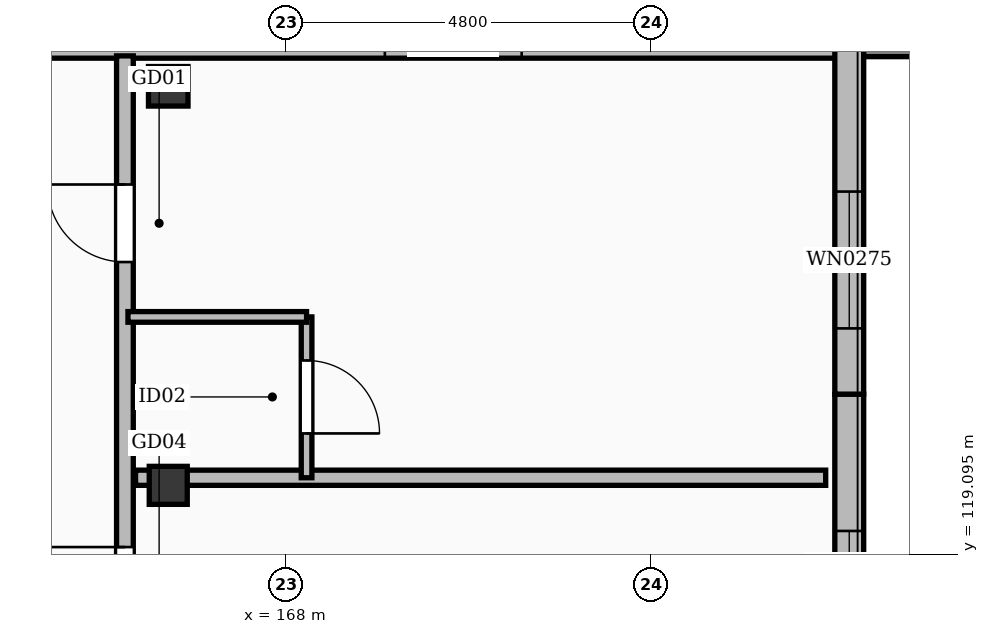
"""IFC4 building model, lengths in metres.
Left out: names, types, materials, properties, quantities, classifications, styles, units other than length and angle.
Written with IfcOpenShell. Run it as: python <this file> out.ifc"""

import sys

from ifc_helpers import new_model, si_unit, direction, frame, frame_2d, origin, origin_2d, place, context, subcontext, project, spatial, polyline, rectangle, outline, extrude, element, fill, save


model = new_model("IFC4")
c1 = context("Model", 3, precision=1e-05, world=origin(), true_north=direction((0.0, 1.0)))
c2 = subcontext(c1, "Body", "Model", "MODEL_VIEW")
j1 = project(units=[si_unit("LENGTHUNIT", "METRE"), si_unit("PLANEANGLEUNIT", "RADIAN")], contexts=[c1])
p1 = place(None, origin())
s1 = spatial("IfcSite", under=j1, at=p1, CompositionType="ELEMENT")
p2 = place(p1, origin())
s2 = spatial("IfcBuilding", under=s1, at=p2, CompositionType="ELEMENT")
p3 = place(p2, frame((0.0, 0.0, 50.4)))
s3 = spatial("IfcBuildingStorey", under=s2, at=p3, CompositionType="ELEMENT", Elevation=50.4)
p4 = place(p3, frame((166.45, 125.25, 0.0), z_axis=(0.0, 0.0, 1.0), x_axis=(1.0, 0.0, 0.0)))
e1 = element("IfcColumn", 1, at=p4, inside=s3, PredefinedType="COLUMN", context=c2, shape_type="SweptSolid", body=[
    extrude(rectangle(XDim=0.52, YDim=0.52, at=origin_2d()), origin(), (0.0, 0.0, 1.0), 4.2),
])
p5 = place(p3, frame((166.45, 120.0, 0.0), z_axis=(0.0, 0.0, 1.0), x_axis=(1.0, 0.0, 0.0)))
e2 = element("IfcColumn", 2, at=p5, inside=s3, PredefinedType="COLUMN", context=c2, shape_type="SweptSolid", body=[
    extrude(rectangle(XDim=0.5, YDim=0.5, at=origin_2d()), origin(), (0.0, 0.0, 1.0), 4.2),
])
p6 = place(p3, frame((153.3, 125.81, 0.0), z_axis=(0.0, 0.0, 1.0), x_axis=(1.0, 0.0, 0.0)))
e3 = element("IfcWall", 3, at=p6, inside=s3, PredefinedType="SOLIDWALL", context=c2, shape_type="SweptSolid", body=[
    extrude(rectangle(XDim=22.2, YDim=0.38, at=frame_2d((11.1, 0.0))), origin(), (0.0, 0.0, 1.0), 3.96),
])
p7 = place(p6, frame((2.8, 0.0, 0.55)))
e4 = element("IfcOpeningElement", 4, at=p7, cuts=e3, PredefinedType="OPENING", context=c2, shape_type="SweptSolid", body=[
    extrude(rectangle(XDim=1.8, YDim=1.76, at=frame_2d((0.9, 0.88))), frame((0.0, 0.202, 0.0), z_axis=(0.0, -1.0, 0.0), x_axis=(1.0, 0.0, 0.0)), (0.0, 0.0, 1.0), 0.404),
])
p8 = place(p6, frame((9.6, 0.0, 0.55)))
e5 = element("IfcOpeningElement", 5, at=p8, cuts=e3, PredefinedType="OPENING", context=c2, shape_type="SweptSolid", body=[
    extrude(rectangle(XDim=1.8, YDim=1.76, at=frame_2d((0.9, 0.88))), frame((0.0, 0.202, 0.0), z_axis=(0.0, -1.0, 0.0), x_axis=(1.0, 0.0, 0.0)), (0.0, 0.0, 1.0), 0.404),
])
p9 = place(p6, frame((16.0, 0.0, 0.55)))
e6 = element("IfcOpeningElement", 6, at=p9, cuts=e3, PredefinedType="OPENING", context=c2, shape_type="SweptSolid", body=[
    extrude(rectangle(XDim=1.8, YDim=1.76, at=frame_2d((0.9, 0.88))), frame((0.0, 0.202, 0.0), z_axis=(0.0, -1.0, 0.0), x_axis=(1.0, 0.0, 0.0)), (0.0, 0.0, 1.0), 0.404),
])
p10 = place(p3, frame((175.41, 121.2, 0.0), z_axis=(0.0, 0.0, 1.0), x_axis=(0.0, -1.0, 0.0)))
e7 = element("IfcWall", 7, at=p10, inside=s3, PredefinedType="SOLIDWALL", context=c2, shape_type="SweptSolid", body=[
    extrude(rectangle(XDim=4.8, YDim=0.38, at=frame_2d((2.4, 0.0))), origin(), (0.0, 0.0, 1.0), 3.96),
])
p11 = place(p10, frame((1.8, 0.0, 0.35)))
e8 = element("IfcOpeningElement", 8, at=p11, cuts=e7, PredefinedType="OPENING", context=c2, shape_type="SweptSolid", body=[
    extrude(rectangle(XDim=0.9, YDim=1.68, at=frame_2d((0.45, 0.84))), frame((0.0, 0.202, 0.0), z_axis=(0.0, -1.0, 0.0), x_axis=(1.0, 0.0, 0.0)), (0.0, 0.0, 1.0), 0.404),
])
p12 = place(p10, frame((3.135, 0.0, 0.55)))
e9 = element("IfcOpeningElement", 9, at=p12, cuts=e7, PredefinedType="OPENING", context=c2, shape_type="SweptSolid", body=[
    extrude(rectangle(XDim=1.2, YDim=1.72, at=frame_2d((0.6, 0.86))), frame((0.0, 0.202, 0.0), z_axis=(0.0, -1.0, 0.0), x_axis=(1.0, 0.0, 0.0)), (0.0, 0.0, 1.0), 0.404),
])
p13 = place(p3, frame((175.41, 126.0, 0.0), z_axis=(0.0, 0.0, 1.0), x_axis=(0.0, -1.0, 0.0)))
e10 = element("IfcWall", 10, at=p13, inside=s3, PredefinedType="SOLIDWALL", context=c2, shape_type="SweptSolid", body=[
    extrude(rectangle(XDim=4.8, YDim=0.38, at=frame_2d((2.4, 0.0))), origin(), (0.0, 0.0, 1.0), 3.96),
])
p14 = place(p13, frame((2.135, 0.0, 0.55)))
e11 = element("IfcOpeningElement", 11, at=p14, cuts=e10, PredefinedType="OPENING", context=c2, shape_type="SweptSolid", body=[
    extrude(rectangle(XDim=1.8, YDim=1.76, at=frame_2d((0.9, 0.88))), frame((0.0, 0.202, 0.0), z_axis=(0.0, -1.0, 0.0), x_axis=(1.0, 0.0, 0.0)), (0.0, 0.0, 1.0), 0.404),
])
p15 = place(p3, frame((175.6, 125.82, 0.0), z_axis=(0.0, 0.0, 1.0), x_axis=(1.0, 0.0, 0.0)))
e12 = element("IfcWall", 12, at=p15, inside=s3, PredefinedType="SOLIDWALL", context=c2, shape_type="SweptSolid", body=[
    extrude(outline(polyline([(0.0, 0.0), (4.4, 0.0), (4.4, 0.05), (0.0, 3.723), (0.0, 0.0)])), frame((0.0, 0.18, 0.0), z_axis=(0.0, -1.0, 0.0), x_axis=(1.0, 0.0, 0.0)), (0.0, 0.0, 1.0), 0.36),
])
p16 = place(p3, frame((165.88, 73.55, 0.0), z_axis=(0.0, 0.0, 1.0), x_axis=(0.0, 1.0, 0.0)))
e13 = element("IfcWall", 13, at=p16, inside=s3, PredefinedType="PARTITIONING", context=c2, shape_type="SweptSolid", body=[
    extrude(rectangle(XDim=52.1, YDim=0.22, at=frame_2d((26.05, 0.0))), origin(), (0.0, 0.0, 1.0), 3.202),
])
p17 = place(p16, frame((5.9, 0.0, 0.0)))
e14 = element("IfcOpeningElement", 14, at=p17, cuts=e13, PredefinedType="OPENING", context=c2, shape_type="SweptSolid", body=[
    extrude(rectangle(XDim=1.12, YDim=2.15, at=frame_2d((0.56, 1.075))), frame((0.0, 0.122, 0.0), z_axis=(0.0, -1.0, 0.0), x_axis=(1.0, 0.0, 0.0)), (0.0, 0.0, 1.0), 0.244),
])
p18 = place(p16, frame((15.788, 0.0, 0.0)))
e15 = element("IfcOpeningElement", 15, at=p18, cuts=e13, PredefinedType="OPENING", context=c2, shape_type="SweptSolid", body=[
    extrude(rectangle(XDim=1.05, YDim=2.22, at=frame_2d((0.525, 1.11))), frame((0.0, 0.122, 0.0), z_axis=(0.0, -1.0, 0.0), x_axis=(1.0, 0.0, 0.0)), (0.0, 0.0, 1.0), 0.244),
])
p19 = place(p16, frame((20.588, 0.0, 0.0)))
e16 = element("IfcOpeningElement", 16, at=p19, cuts=e13, PredefinedType="OPENING", context=c2, shape_type="SweptSolid", body=[
    extrude(rectangle(XDim=1.02, YDim=2.2, at=frame_2d((0.51, 1.1))), frame((0.0, 0.122, 0.0), z_axis=(0.0, -1.0, 0.0), x_axis=(1.0, 0.0, 0.0)), (0.0, 0.0, 1.0), 0.244),
])
p20 = place(p16, frame((25.388, 0.0, 0.0)))
e17 = element("IfcOpeningElement", 17, at=p20, cuts=e13, PredefinedType="OPENING", context=c2, shape_type="SweptSolid", body=[
    extrude(rectangle(XDim=1.14, YDim=2.26, at=frame_2d((0.57, 1.13))), frame((0.0, 0.122, 0.0), z_axis=(0.0, -1.0, 0.0), x_axis=(1.0, 0.0, 0.0)), (0.0, 0.0, 1.0), 0.244),
])
p21 = place(p16, frame((30.188, 0.0, 0.0)))
e18 = element("IfcOpeningElement", 18, at=p21, cuts=e13, PredefinedType="OPENING", context=c2, shape_type="SweptSolid", body=[
    extrude(rectangle(XDim=0.98, YDim=2.15, at=frame_2d((0.49, 1.075))), frame((0.0, 0.122, 0.0), z_axis=(0.0, -1.0, 0.0), x_axis=(1.0, 0.0, 0.0)), (0.0, 0.0, 1.0), 0.244),
])
p22 = place(p16, frame((34.988, 0.0, 0.0)))
e19 = element("IfcOpeningElement", 19, at=p22, cuts=e13, PredefinedType="OPENING", context=c2, shape_type="SweptSolid", body=[
    extrude(rectangle(XDim=1.28, YDim=2.16, at=frame_2d((0.64, 1.08))), frame((0.0, 0.122, 0.0), z_axis=(0.0, -1.0, 0.0), x_axis=(1.0, 0.0, 0.0)), (0.0, 0.0, 1.0), 0.244),
])
p23 = place(p16, frame((39.788, 0.0, 0.0)))
e20 = element("IfcOpeningElement", 20, at=p23, cuts=e13, PredefinedType="OPENING", context=c2, shape_type="SweptSolid", body=[
    extrude(rectangle(XDim=0.9, YDim=2.08, at=frame_2d((0.45, 1.04))), frame((0.0, 0.122, 0.0), z_axis=(0.0, -1.0, 0.0), x_axis=(1.0, 0.0, 0.0)), (0.0, 0.0, 1.0), 0.244),
])
p24 = place(p16, frame((44.588, 0.0, 0.0)))
e21 = element("IfcOpeningElement", 21, at=p24, cuts=e13, PredefinedType="OPENING", context=c2, shape_type="SweptSolid", body=[
    extrude(rectangle(XDim=1.05, YDim=2.22, at=frame_2d((0.525, 1.11))), frame((0.0, 0.122, 0.0), z_axis=(0.0, -1.0, 0.0), x_axis=(1.0, 0.0, 0.0)), (0.0, 0.0, 1.0), 0.244),
])
p25 = place(p16, frame((49.388, 0.0, 0.0)))
e22 = element("IfcOpeningElement", 22, at=p25, cuts=e13, PredefinedType="OPENING", context=c2, shape_type="SweptSolid", body=[
    extrude(rectangle(XDim=1.02, YDim=2.2, at=frame_2d((0.51, 1.1))), frame((0.0, 0.122, 0.0), z_axis=(0.0, -1.0, 0.0), x_axis=(1.0, 0.0, 0.0)), (0.0, 0.0, 1.0), 0.244),
])
p26 = place(p3, frame((166.02, 120.1, 0.0), z_axis=(0.0, 0.0, 1.0), x_axis=(1.0, 0.0, 0.0)))
e23 = element("IfcWall", 23, at=p26, inside=s3, PredefinedType="PARTITIONING", context=c2, shape_type="SweptSolid", body=[
    extrude(rectangle(XDim=9.08, YDim=0.2, at=frame_2d((4.54, 0.0))), origin(), (0.0, 0.0, 1.0), 3.352),
])
p27 = place(p3, frame((168.27, 120.1, 0.0), z_axis=(0.0, 0.0, 1.0), x_axis=(0.0, 1.0, 0.0)))
e24 = element("IfcWall", 24, at=p27, inside=s3, PredefinedType="PARTITIONING", context=c2, shape_type="SweptSolid", body=[
    extrude(rectangle(XDim=2.116, YDim=0.14, at=frame_2d((1.058, 0.0))), origin(), (0.0, 0.0, 1.0), 3.96),
])
p28 = place(p27, frame((0.583, 0.0, 0.0)))
e25 = element("IfcOpeningElement", 25, at=p28, cuts=e24, PredefinedType="OPENING", context=c2, shape_type="SweptSolid", body=[
    extrude(rectangle(XDim=0.96, YDim=2.12, at=frame_2d((0.48, 1.06))), frame((0.0, 0.082, 0.0), z_axis=(0.0, -1.0, 0.0), x_axis=(1.0, 0.0, 0.0)), (0.0, 0.0, 1.0), 0.164),
])
p29 = place(p3, frame((165.92, 122.216, 0.0), z_axis=(0.0, 0.0, 1.0), x_axis=(1.0, 0.0, 0.0)))
e26 = element("IfcWall", 26, at=p29, inside=s3, PredefinedType="PARTITIONING", context=c2, shape_type="SweptSolid", body=[
    extrude(rectangle(XDim=2.35, YDim=0.14, at=frame_2d((1.175, 0.0))), origin(), (0.0, 0.0, 1.0), 3.352),
])
p30 = place(p11, origin())
e27 = element("IfcWindow", 27, at=p30, inside=s3, PartitioningType="SINGLE_PANEL", PredefinedType="WINDOW", context=c2, shape_type="SweptSolid", body=[
    extrude(rectangle(XDim=0.9, YDim=1.68, at=frame_2d((0.45, 0.84))), frame((0.0, 0.03, 0.0), z_axis=(0.0, -1.0, 0.0), x_axis=(1.0, 0.0, 0.0)), (0.0, 0.0, 1.0), 0.06),
])
fill(e8, e27)
p31 = place(p14, origin())
e28 = element("IfcWindow", 28, at=p31, inside=s3, PartitioningType="SINGLE_PANEL", PredefinedType="WINDOW", context=c2, shape_type="SweptSolid", body=[
    extrude(rectangle(XDim=1.8, YDim=1.76, at=frame_2d((0.9, 0.88))), frame((0.0, 0.03, 0.0), z_axis=(0.0, -1.0, 0.0), x_axis=(1.0, 0.0, 0.0)), (0.0, 0.0, 1.0), 0.06),
])
fill(e11, e28)
p32 = place(p24, origin())
e29 = element("IfcDoor", 29, at=p32, inside=s3, OperationType="SINGLE_SWING_RIGHT", PredefinedType="DOOR", context=c2, shape_type="SweptSolid", body=[
    extrude(rectangle(XDim=1.05, YDim=2.22, at=frame_2d((0.525, 1.11))), frame((0.0, 0.025, 0.0), z_axis=(0.0, -1.0, 0.0), x_axis=(1.0, 0.0, 0.0)), (0.0, 0.0, 1.0), 0.05),
])
fill(e21, e29)
p33 = place(p25, origin())
e30 = element("IfcDoor", 30, at=p33, inside=s3, OperationType="SINGLE_SWING_RIGHT", PredefinedType="DOOR", context=c2, shape_type="SweptSolid", body=[
    extrude(rectangle(XDim=1.02, YDim=2.2, at=frame_2d((0.51, 1.1))), frame((0.0, 0.025, 0.0), z_axis=(0.0, -1.0, 0.0), x_axis=(1.0, 0.0, 0.0)), (0.0, 0.0, 1.0), 0.05),
])
fill(e22, e30)
p34 = place(p28, frame((0.96, 0.0, 0.0), z_axis=(0.0, 0.0, 1.0), x_axis=(-1.0, 0.0, 0.0)))
e31 = element("IfcDoor", 31, at=p34, inside=s3, OperationType="SINGLE_SWING_LEFT", PredefinedType="DOOR", context=c2, shape_type="SweptSolid", body=[
    extrude(rectangle(XDim=0.96, YDim=2.12, at=frame_2d((0.48, 1.06))), frame((0.0, 0.025, 0.0), z_axis=(0.0, -1.0, 0.0), x_axis=(1.0, 0.0, 0.0)), (0.0, 0.0, 1.0), 0.05),
])
fill(e25, e31)
save(model, sys.argv[1])
